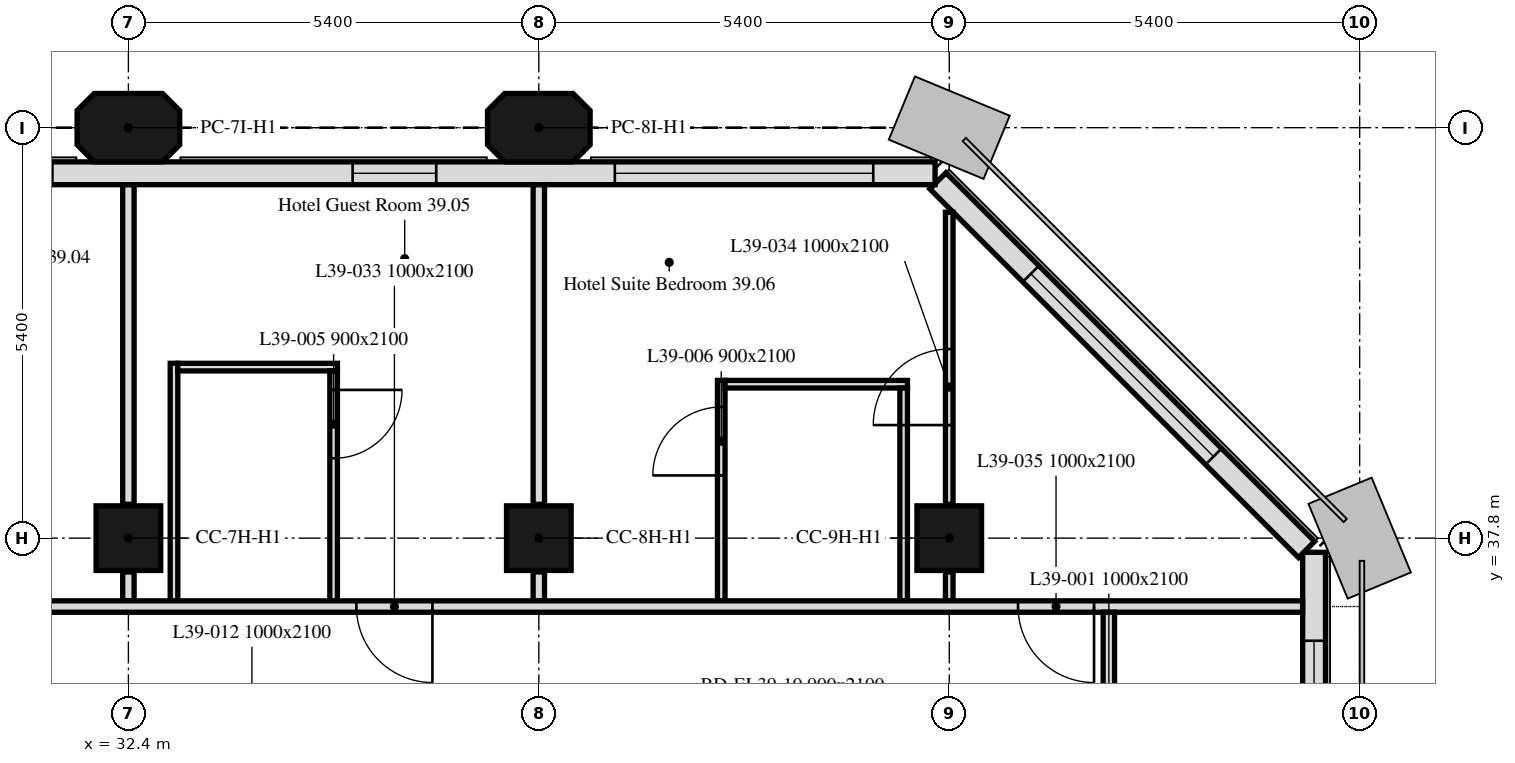
"""IFC4 building model, lengths in metres.
Left out: names, types, materials, properties, quantities, classifications, styles, units other than length and angle.
Written with IfcOpenShell. Run it as: python <this file> out.ifc"""

import sys

from ifc_helpers import new_model, si_unit, direction, frame, frame_2d, origin, origin_2d, place, context, subcontext, project, spatial, polyline, rectangle, outline, extrude, element, fill, save


model = new_model("IFC4")
c1 = context("Model", 3, precision=1e-05, world=origin(), true_north=direction((0.0, 1.0)))
c2 = subcontext(c1, "Body", "Model", "MODEL_VIEW")
j1 = project(units=[si_unit("LENGTHUNIT", "METRE"), si_unit("PLANEANGLEUNIT", "RADIAN")], contexts=[c1])
p1 = place(None, origin())
s1 = spatial("IfcSite", under=j1, at=p1, CompositionType="ELEMENT")
p2 = place(p1, origin())
s2 = spatial("IfcBuilding", under=s1, at=p2, CompositionType="ELEMENT")
p3 = place(p2, frame((0.0, 0.0, 166.0)))
s3 = spatial("IfcBuildingStorey", under=s2, at=p3, CompositionType="ELEMENT", Elevation=166.0)
for number, where, z_axis, x_axis in (
    (1, (32.4, 37.8, 0.0), (0.0, 0.0, 1.0), (1.0, 0.0, 0.0)),
    (2, (37.8, 37.8, 0.0), (0.0, 0.0, 1.0), (1.0, 0.0, 0.0)),
    (3, (43.2, 37.8, 0.0), (0.0, 0.0, 1.0), (1.0, 0.0, 0.0)),
):
    element("IfcColumn", number, at=place(p3, frame(where, z_axis=z_axis, x_axis=x_axis)), inside=s3, PredefinedType="COLUMN", context=c2, shape_type="SweptSolid", body=[
        extrude(rectangle(XDim=0.85, YDim=0.85, at=origin_2d()), origin(), (0.0, 0.0, 1.0), 3.0),
    ])
for number, where, z_axis, x_axis in (
    (4, (32.4, 43.2, 0.0), (0.0, 0.0, 1.0), (1.0, 0.0, 0.0)),
    (5, (37.8, 43.2, 0.0), (0.0, 0.0, 1.0), (1.0, 0.0, 0.0)),
):
    element("IfcColumn", number, at=place(p3, frame(where, z_axis=z_axis, x_axis=x_axis)), inside=s3, PredefinedType="COLUMN", context=c2, shape_type="SweptSolid", body=[
        extrude(outline(polyline([(-0.45, -0.45), (0.45, -0.45), (0.675, -0.225), (0.675, 0.225), (0.45, 0.45), (-0.45, 0.45), (-0.675, 0.225), (-0.675, -0.225), (-0.45, -0.45)])), origin(), (0.0, 0.0, 1.0), 3.0),
    ])
p4 = place(p3, frame((48.0, 5.586, 0.0), z_axis=(0.0, 0.0, 1.0), x_axis=(0.0, 1.0, 0.0)))
e6 = element("IfcWall", 6, at=p4, inside=s3, PredefinedType="SOLIDWALL", context=c2, shape_type="SweptSolid", body=[
    extrude(rectangle(XDim=32.027, YDim=0.3, at=frame_2d((16.014, 0.0))), origin(), (0.0, 0.0, 1.0), 3.0),
])
p5 = place(p4, frame((1.164, 0.0, 0.9)))
e7 = element("IfcOpeningElement", 7, at=p5, cuts=e6, PredefinedType="OPENING", context=c2, shape_type="SweptSolid", body=[
    extrude(rectangle(XDim=1.1, YDim=1.7, at=frame_2d((0.55, 0.85))), frame((0.0, 0.16, 0.0), z_axis=(0.0, -1.0, 0.0), x_axis=(1.0, 0.0, 0.0)), (0.0, 0.0, 1.0), 0.32),
])
p6 = place(p4, frame((2.589, 0.0, 0.9)))
e8 = element("IfcOpeningElement", 8, at=p6, cuts=e6, PredefinedType="OPENING", context=c2, shape_type="SweptSolid", body=[
    extrude(rectangle(XDim=0.65, YDim=1.7, at=frame_2d((0.325, 0.85))), frame((0.0, 0.16, 0.0), z_axis=(0.0, -1.0, 0.0), x_axis=(1.0, 0.0, 0.0)), (0.0, 0.0, 1.0), 0.32),
])
p7 = place(p4, frame((6.564, 0.0, 0.9)))
e9 = element("IfcOpeningElement", 9, at=p7, cuts=e6, PredefinedType="OPENING", context=c2, shape_type="SweptSolid", body=[
    extrude(rectangle(XDim=1.1, YDim=1.7, at=frame_2d((0.55, 0.85))), frame((0.0, 0.16, 0.0), z_axis=(0.0, -1.0, 0.0), x_axis=(1.0, 0.0, 0.0)), (0.0, 0.0, 1.0), 0.32),
])
p8 = place(p4, frame((8.164, 0.0, 0.9)))
e10 = element("IfcOpeningElement", 10, at=p8, cuts=e6, PredefinedType="OPENING", context=c2, shape_type="SweptSolid", body=[
    extrude(rectangle(XDim=1.1, YDim=1.7, at=frame_2d((0.55, 0.85))), frame((0.0, 0.16, 0.0), z_axis=(0.0, -1.0, 0.0), x_axis=(1.0, 0.0, 0.0)), (0.0, 0.0, 1.0), 0.32),
])
p9 = place(p4, frame((11.614, 0.0, 0.9)))
e11 = element("IfcOpeningElement", 11, at=p9, cuts=e6, PredefinedType="OPENING", context=c2, shape_type="SweptSolid", body=[
    extrude(rectangle(XDim=3.4, YDim=1.7, at=frame_2d((1.7, 0.85))), frame((0.0, 0.16, 0.0), z_axis=(0.0, -1.0, 0.0), x_axis=(1.0, 0.0, 0.0)), (0.0, 0.0, 1.0), 0.32),
])
p10 = place(p4, frame((17.364, 0.0, 0.9)))
e12 = element("IfcOpeningElement", 12, at=p10, cuts=e6, PredefinedType="OPENING", context=c2, shape_type="SweptSolid", body=[
    extrude(rectangle(XDim=1.1, YDim=1.7, at=frame_2d((0.55, 0.85))), frame((0.0, 0.16, 0.0), z_axis=(0.0, -1.0, 0.0), x_axis=(1.0, 0.0, 0.0)), (0.0, 0.0, 1.0), 0.32),
])
p11 = place(p4, frame((18.964, 0.0, 0.9)))
e13 = element("IfcOpeningElement", 13, at=p11, cuts=e6, PredefinedType="OPENING", context=c2, shape_type="SweptSolid", body=[
    extrude(rectangle(XDim=1.1, YDim=1.7, at=frame_2d((0.55, 0.85))), frame((0.0, 0.16, 0.0), z_axis=(0.0, -1.0, 0.0), x_axis=(1.0, 0.0, 0.0)), (0.0, 0.0, 1.0), 0.32),
])
p12 = place(p4, frame((22.414, 0.0, 0.9)))
e14 = element("IfcOpeningElement", 14, at=p12, cuts=e6, PredefinedType="OPENING", context=c2, shape_type="SweptSolid", body=[
    extrude(rectangle(XDim=3.4, YDim=1.7, at=frame_2d((1.7, 0.85))), frame((0.0, 0.16, 0.0), z_axis=(0.0, -1.0, 0.0), x_axis=(1.0, 0.0, 0.0)), (0.0, 0.0, 1.0), 0.32),
])
p13 = place(p4, frame((28.164, 0.0, 0.9)))
e15 = element("IfcOpeningElement", 15, at=p13, cuts=e6, PredefinedType="OPENING", context=c2, shape_type="SweptSolid", body=[
    extrude(rectangle(XDim=1.1, YDim=1.7, at=frame_2d((0.55, 0.85))), frame((0.0, 0.16, 0.0), z_axis=(0.0, -1.0, 0.0), x_axis=(1.0, 0.0, 0.0)), (0.0, 0.0, 1.0), 0.32),
])
p14 = place(p4, frame((29.764, 0.0, 0.9)))
e16 = element("IfcOpeningElement", 16, at=p14, cuts=e6, PredefinedType="OPENING", context=c2, shape_type="SweptSolid", body=[
    extrude(rectangle(XDim=1.1, YDim=1.7, at=frame_2d((0.55, 0.85))), frame((0.0, 0.16, 0.0), z_axis=(0.0, -1.0, 0.0), x_axis=(1.0, 0.0, 0.0)), (0.0, 0.0, 1.0), 0.32),
])
p15 = place(p3, frame((47.901, 37.65, 0.0), z_axis=(0.0, 0.0, 1.0), x_axis=(-0.707106781187, 0.707106781187, 0.0)))
e17 = element("IfcWall", 17, at=p15, inside=s3, PredefinedType="SOLIDWALL", context=c2, shape_type="SweptSolid", body=[
    extrude(rectangle(XDim=6.86, YDim=0.3, at=frame_2d((3.43, 0.0))), origin(), (0.0, 0.0, 1.0), 3.0),
])
p16 = place(p15, frame((1.73, 0.0, 0.9)))
e18 = element("IfcOpeningElement", 18, at=p16, cuts=e17, PredefinedType="OPENING", context=c2, shape_type="SweptSolid", body=[
    extrude(rectangle(XDim=3.4, YDim=1.7, at=frame_2d((1.7, 0.85))), frame((0.0, 0.16, 0.0), z_axis=(0.0, -1.0, 0.0), x_axis=(1.0, 0.0, 0.0)), (0.0, 0.0, 1.0), 0.32),
])
p17 = place(p3, frame((43.014, 42.6, 0.0), z_axis=(0.0, 0.0, 1.0), x_axis=(-1.0, 0.0, 0.0)))
e19 = element("IfcWall", 19, at=p17, inside=s3, PredefinedType="SOLIDWALL", context=c2, shape_type="SweptSolid", body=[
    extrude(rectangle(XDim=32.027, YDim=0.3, at=frame_2d((16.014, 0.0))), origin(), (0.0, 0.0, 1.0), 3.0),
])
p18 = place(p17, frame((0.814, 0.0, 0.9)))
e20 = element("IfcOpeningElement", 20, at=p18, cuts=e19, PredefinedType="OPENING", context=c2, shape_type="SweptSolid", body=[
    extrude(rectangle(XDim=3.4, YDim=1.7, at=frame_2d((1.7, 0.85))), frame((0.0, 0.16, 0.0), z_axis=(0.0, -1.0, 0.0), x_axis=(1.0, 0.0, 0.0)), (0.0, 0.0, 1.0), 0.32),
])
p19 = place(p17, frame((6.564, 0.0, 0.9)))
e21 = element("IfcOpeningElement", 21, at=p19, cuts=e19, PredefinedType="OPENING", context=c2, shape_type="SweptSolid", body=[
    extrude(rectangle(XDim=1.1, YDim=1.7, at=frame_2d((0.55, 0.85))), frame((0.0, 0.16, 0.0), z_axis=(0.0, -1.0, 0.0), x_axis=(1.0, 0.0, 0.0)), (0.0, 0.0, 1.0), 0.32),
])
p20 = place(p17, frame((11.614, 0.0, 0.9)))
e22 = element("IfcOpeningElement", 22, at=p20, cuts=e19, PredefinedType="OPENING", context=c2, shape_type="SweptSolid", body=[
    extrude(rectangle(XDim=3.4, YDim=1.7, at=frame_2d((1.7, 0.85))), frame((0.0, 0.16, 0.0), z_axis=(0.0, -1.0, 0.0), x_axis=(1.0, 0.0, 0.0)), (0.0, 0.0, 1.0), 0.32),
])
p21 = place(p17, frame((17.364, 0.0, 0.9)))
e23 = element("IfcOpeningElement", 23, at=p21, cuts=e19, PredefinedType="OPENING", context=c2, shape_type="SweptSolid", body=[
    extrude(rectangle(XDim=1.1, YDim=1.7, at=frame_2d((0.55, 0.85))), frame((0.0, 0.16, 0.0), z_axis=(0.0, -1.0, 0.0), x_axis=(1.0, 0.0, 0.0)), (0.0, 0.0, 1.0), 0.32),
])
p22 = place(p17, frame((22.414, 0.0, 0.9)))
e24 = element("IfcOpeningElement", 24, at=p22, cuts=e19, PredefinedType="OPENING", context=c2, shape_type="SweptSolid", body=[
    extrude(rectangle(XDim=3.4, YDim=1.7, at=frame_2d((1.7, 0.85))), frame((0.0, 0.16, 0.0), z_axis=(0.0, -1.0, 0.0), x_axis=(1.0, 0.0, 0.0)), (0.0, 0.0, 1.0), 0.32),
])
p23 = place(p17, frame((28.164, 0.0, 0.9)))
e25 = element("IfcOpeningElement", 25, at=p23, cuts=e19, PredefinedType="OPENING", context=c2, shape_type="SweptSolid", body=[
    extrude(rectangle(XDim=1.1, YDim=1.7, at=frame_2d((0.55, 0.85))), frame((0.0, 0.16, 0.0), z_axis=(0.0, -1.0, 0.0), x_axis=(1.0, 0.0, 0.0)), (0.0, 0.0, 1.0), 0.32),
])
p24 = place(p3, frame((32.4, 36.975, 0.0), z_axis=(0.0, 0.0, 1.0), x_axis=(0.0, 1.0, 0.0)))
e26 = element("IfcWall", 26, at=p24, inside=s3, PredefinedType="PARTITIONING", context=c2, shape_type="SweptSolid", body=[
    extrude(rectangle(XDim=0.38, YDim=0.15, at=frame_2d((0.19, 0.0))), origin(), (0.0, 0.0, 1.0), 3.0),
])
p25 = place(p3, frame((32.4, 38.245, 0.0), z_axis=(0.0, 0.0, 1.0), x_axis=(0.0, 1.0, 0.0)))
e27 = element("IfcWall", 27, at=p25, inside=s3, PredefinedType="PARTITIONING", context=c2, shape_type="SweptSolid", body=[
    extrude(rectangle(XDim=4.204, YDim=0.15, at=frame_2d((2.102, 0.0))), origin(), (0.0, 0.0, 1.0), 3.0),
])
p26 = place(p3, frame((33.0, 36.975, 0.0), z_axis=(0.0, 0.0, 1.0), x_axis=(0.0, 1.0, 0.0)))
e28 = element("IfcWall", 28, at=p26, inside=s3, PredefinedType="PARTITIONING", context=c2, shape_type="SweptSolid", body=[
    extrude(rectangle(XDim=3.125, YDim=0.1, at=frame_2d((1.562, 0.0))), origin(), (0.0, 0.0, 1.0), 3.0),
])
p27 = place(p3, frame((33.05, 40.05, 0.0), z_axis=(0.0, 0.0, 1.0), x_axis=(1.0, 0.0, 0.0)))
e29 = element("IfcWall", 29, at=p27, inside=s3, PredefinedType="PARTITIONING", context=c2, shape_type="SweptSolid", body=[
    extrude(rectangle(XDim=2.1, YDim=0.1, at=frame_2d((1.05, 0.0))), origin(), (0.0, 0.0, 1.0), 3.0),
])
p28 = place(p3, frame((35.1, 40.0, 0.0), z_axis=(0.0, 0.0, 1.0), x_axis=(0.0, -1.0, 0.0)))
e30 = element("IfcWall", 30, at=p28, inside=s3, PredefinedType="PARTITIONING", context=c2, shape_type="SweptSolid", body=[
    extrude(rectangle(XDim=3.025, YDim=0.1, at=frame_2d((1.512, 0.0))), origin(), (0.0, 0.0, 1.0), 3.0),
])
p29 = place(p28, frame((0.25, 0.0, 0.0)))
e31 = element("IfcOpeningElement", 31, at=p29, cuts=e30, PredefinedType="OPENING", context=c2, shape_type="SweptSolid", body=[
    extrude(rectangle(XDim=0.9, YDim=2.1, at=frame_2d((0.45, 1.05))), frame((0.0, 0.05, 0.0), z_axis=(0.0, -1.0, 0.0), x_axis=(1.0, 0.0, 0.0)), (0.0, 0.0, 1.0), 0.1),
])
p30 = place(p3, frame((37.8, 36.975, 0.0), z_axis=(0.0, 0.0, 1.0), x_axis=(0.0, 1.0, 0.0)))
e32 = element("IfcWall", 32, at=p30, inside=s3, PredefinedType="PARTITIONING", context=c2, shape_type="SweptSolid", body=[
    extrude(rectangle(XDim=0.38, YDim=0.15, at=frame_2d((0.19, 0.0))), origin(), (0.0, 0.0, 1.0), 3.0),
])
p31 = place(p3, frame((37.8, 38.245, 0.0), z_axis=(0.0, 0.0, 1.0), x_axis=(0.0, 1.0, 0.0)))
e33 = element("IfcWall", 33, at=p31, inside=s3, PredefinedType="PARTITIONING", context=c2, shape_type="SweptSolid", body=[
    extrude(rectangle(XDim=4.204, YDim=0.15, at=frame_2d((2.102, 0.0))), origin(), (0.0, 0.0, 1.0), 3.0),
])
p32 = place(p3, frame((40.2, 36.975, 0.0), z_axis=(0.0, 0.0, 1.0), x_axis=(0.0, 1.0, 0.0)))
e34 = element("IfcWall", 34, at=p32, inside=s3, PredefinedType="PARTITIONING", context=c2, shape_type="SweptSolid", body=[
    extrude(rectangle(XDim=2.9, YDim=0.1, at=frame_2d((1.45, 0.0))), origin(), (0.0, 0.0, 1.0), 3.0),
])
p33 = place(p32, frame((1.65, 0.0, 0.0)))
e35 = element("IfcOpeningElement", 35, at=p33, cuts=e34, PredefinedType="OPENING", context=c2, shape_type="SweptSolid", body=[
    extrude(rectangle(XDim=0.9, YDim=2.1, at=frame_2d((0.45, 1.05))), frame((0.0, 0.05, 0.0), z_axis=(0.0, -1.0, 0.0), x_axis=(1.0, 0.0, 0.0)), (0.0, 0.0, 1.0), 0.1),
])
p34 = place(p3, frame((40.25, 39.825, 0.0), z_axis=(0.0, 0.0, 1.0), x_axis=(1.0, 0.0, 0.0)))
e36 = element("IfcWall", 36, at=p34, inside=s3, PredefinedType="PARTITIONING", context=c2, shape_type="SweptSolid", body=[
    extrude(rectangle(XDim=2.4, YDim=0.1, at=frame_2d((1.2, 0.0))), origin(), (0.0, 0.0, 1.0), 3.0),
])
p35 = place(p3, frame((42.6, 39.775, 0.0), z_axis=(0.0, 0.0, 1.0), x_axis=(0.0, -1.0, 0.0)))
e37 = element("IfcWall", 37, at=p35, inside=s3, PredefinedType="PARTITIONING", context=c2, shape_type="SweptSolid", body=[
    extrude(rectangle(XDim=2.8, YDim=0.1, at=frame_2d((1.4, 0.0))), origin(), (0.0, 0.0, 1.0), 3.0),
])
p36 = place(p3, frame((43.2, 36.975, 0.0), z_axis=(0.0, 0.0, 1.0), x_axis=(0.0, 1.0, 0.0)))
e38 = element("IfcWall", 38, at=p36, inside=s3, PredefinedType="PARTITIONING", context=c2, shape_type="SweptSolid", body=[
    extrude(rectangle(XDim=0.38, YDim=0.1, at=frame_2d((0.19, 0.0))), origin(), (0.0, 0.0, 1.0), 3.0),
])
p37 = place(p3, frame((43.2, 38.245, 0.0), z_axis=(0.0, 0.0, 1.0), x_axis=(0.0, 1.0, 0.0)))
e39 = element("IfcWall", 39, at=p37, inside=s3, PredefinedType="PARTITIONING", context=c2, shape_type="SweptSolid", body=[
    extrude(rectangle(XDim=3.843, YDim=0.1, at=frame_2d((1.921, 0.0))), origin(), (0.0, 0.0, 1.0), 3.0),
])
p38 = place(p37, frame((1.042, 0.0, 0.0)))
e40 = element("IfcOpeningElement", 40, at=p38, cuts=e39, PredefinedType="OPENING", context=c2, shape_type="SweptSolid", body=[
    extrude(rectangle(XDim=1.0, YDim=2.1, at=frame_2d((0.5, 1.05))), frame((0.0, 0.05, 0.0), z_axis=(0.0, -1.0, 0.0), x_axis=(1.0, 0.0, 0.0)), (0.0, 0.0, 1.0), 0.1),
])
p39 = place(p3, frame((47.849, 36.9, 0.0), z_axis=(0.0, 0.0, 1.0), x_axis=(-1.0, 0.0, 0.0)))
e41 = element("IfcWall", 41, at=p39, inside=s3, PredefinedType="PARTITIONING", context=c2, shape_type="SweptSolid", body=[
    extrude(rectangle(XDim=41.698, YDim=0.15, at=frame_2d((20.849, 0.0))), origin(), (0.0, 0.0, 1.0), 3.0),
])
p40 = place(p39, frame((39.249, 0.0, 0.0)))
e42 = element("IfcOpeningElement", 42, at=p40, cuts=e41, PredefinedType="OPENING", context=c2, shape_type="SweptSolid", body=[
    extrude(rectangle(XDim=1.0, YDim=2.1, at=frame_2d((0.5, 1.05))), frame((0.0, 0.075, 0.0), z_axis=(0.0, -1.0, 0.0), x_axis=(1.0, 0.0, 0.0)), (0.0, 0.0, 1.0), 0.15),
])
p41 = place(p39, frame((28.449, 0.0, 0.0)))
e43 = element("IfcOpeningElement", 43, at=p41, cuts=e41, PredefinedType="OPENING", context=c2, shape_type="SweptSolid", body=[
    extrude(rectangle(XDim=1.0, YDim=2.1, at=frame_2d((0.5, 1.05))), frame((0.0, 0.075, 0.0), z_axis=(0.0, -1.0, 0.0), x_axis=(1.0, 0.0, 0.0)), (0.0, 0.0, 1.0), 0.15),
])
p42 = place(p39, frame((16.849, 0.0, 0.0)))
e44 = element("IfcOpeningElement", 44, at=p42, cuts=e41, PredefinedType="OPENING", context=c2, shape_type="SweptSolid", body=[
    extrude(rectangle(XDim=1.0, YDim=2.1, at=frame_2d((0.5, 1.05))), frame((0.0, 0.075, 0.0), z_axis=(0.0, -1.0, 0.0), x_axis=(1.0, 0.0, 0.0)), (0.0, 0.0, 1.0), 0.15),
])
p43 = place(p39, frame((11.449, 0.0, 0.0)))
e45 = element("IfcOpeningElement", 45, at=p43, cuts=e41, PredefinedType="OPENING", context=c2, shape_type="SweptSolid", body=[
    extrude(rectangle(XDim=1.0, YDim=2.1, at=frame_2d((0.5, 1.05))), frame((0.0, 0.075, 0.0), z_axis=(0.0, -1.0, 0.0), x_axis=(1.0, 0.0, 0.0)), (0.0, 0.0, 1.0), 0.15),
])
p44 = place(p39, frame((2.744, 0.0, 0.0)))
e46 = element("IfcOpeningElement", 46, at=p44, cuts=e41, PredefinedType="OPENING", context=c2, shape_type="SweptSolid", body=[
    extrude(rectangle(XDim=1.0, YDim=2.1, at=frame_2d((0.5, 1.05))), frame((0.0, 0.075, 0.0), z_axis=(0.0, -1.0, 0.0), x_axis=(1.0, 0.0, 0.0)), (0.0, 0.0, 1.0), 0.15),
])
p45 = place(p3, frame((45.3, 36.825, 0.0), z_axis=(0.0, 0.0, 1.0), x_axis=(0.0, -1.0, 0.0)))
e47 = element("IfcWall", 47, at=p45, inside=s3, PredefinedType="PARTITIONING", context=c2, shape_type="SweptSolid", body=[
    extrude(rectangle(XDim=15.15, YDim=0.15, at=frame_2d((7.575, 0.0))), origin(), (0.0, 0.0, 1.0), 2.4),
])
p46 = place(p45, frame((1.675, 0.0, 0.0)))
e48 = element("IfcOpeningElement", 48, at=p46, cuts=e47, PredefinedType="OPENING", context=c2, shape_type="SweptSolid", body=[
    extrude(rectangle(XDim=1.0, YDim=2.1, at=frame_2d((0.5, 1.05))), frame((0.0, 0.075, 0.0), z_axis=(0.0, -1.0, 0.0), x_axis=(1.0, 0.0, 0.0)), (0.0, 0.0, 1.0), 0.15),
])
p47 = place(p45, frame((7.975, 0.0, 0.0)))
e49 = element("IfcOpeningElement", 49, at=p47, cuts=e47, PredefinedType="OPENING", context=c2, shape_type="SweptSolid", body=[
    extrude(rectangle(XDim=1.0, YDim=2.1, at=frame_2d((0.5, 1.05))), frame((0.0, 0.075, 0.0), z_axis=(0.0, -1.0, 0.0), x_axis=(1.0, 0.0, 0.0)), (0.0, 0.0, 1.0), 0.15),
])
p48 = place(p14, origin())
e50 = element("IfcWindow", 50, at=p48, inside=s3, PartitioningType="SINGLE_PANEL", PredefinedType="WINDOW", context=c2, shape_type="SweptSolid", body=[
    extrude(rectangle(XDim=1.1, YDim=1.7, at=frame_2d((0.55, 0.85))), frame((0.0, 0.03, 0.0), z_axis=(0.0, -1.0, 0.0), x_axis=(1.0, 0.0, 0.0)), (0.0, 0.0, 1.0), 0.06),
])
fill(e16, e50)
p49 = place(p16, origin())
e51 = element("IfcWindow", 51, at=p49, inside=s3, PartitioningType="SINGLE_PANEL", PredefinedType="WINDOW", context=c2, shape_type="SweptSolid", body=[
    extrude(rectangle(XDim=3.4, YDim=1.7, at=frame_2d((1.7, 0.85))), frame((0.0, 0.03, 0.0), z_axis=(0.0, -1.0, 0.0), x_axis=(1.0, 0.0, 0.0)), (0.0, 0.0, 1.0), 0.06),
])
fill(e18, e51)
p50 = place(p18, origin())
e52 = element("IfcWindow", 52, at=p50, inside=s3, PartitioningType="SINGLE_PANEL", PredefinedType="WINDOW", context=c2, shape_type="SweptSolid", body=[
    extrude(rectangle(XDim=3.4, YDim=1.7, at=frame_2d((1.7, 0.85))), frame((0.0, 0.03, 0.0), z_axis=(0.0, -1.0, 0.0), x_axis=(1.0, 0.0, 0.0)), (0.0, 0.0, 1.0), 0.06),
])
fill(e20, e52)
p51 = place(p19, origin())
e53 = element("IfcWindow", 53, at=p51, inside=s3, PartitioningType="SINGLE_PANEL", PredefinedType="WINDOW", context=c2, shape_type="SweptSolid", body=[
    extrude(rectangle(XDim=1.1, YDim=1.7, at=frame_2d((0.55, 0.85))), frame((0.0, 0.03, 0.0), z_axis=(0.0, -1.0, 0.0), x_axis=(1.0, 0.0, 0.0)), (0.0, 0.0, 1.0), 0.06),
])
fill(e21, e53)
p52 = place(p20, origin())
e54 = element("IfcWindow", 54, at=p52, inside=s3, PartitioningType="SINGLE_PANEL", PredefinedType="WINDOW", context=c2, shape_type="SweptSolid", body=[
    extrude(rectangle(XDim=3.4, YDim=1.7, at=frame_2d((1.7, 0.85))), frame((0.0, 0.03, 0.0), z_axis=(0.0, -1.0, 0.0), x_axis=(1.0, 0.0, 0.0)), (0.0, 0.0, 1.0), 0.06),
])
fill(e22, e54)
p53 = place(p29, origin())
e55 = element("IfcDoor", 55, at=p53, inside=s3, OperationType="SINGLE_SWING_LEFT", PredefinedType="DOOR", context=c2, shape_type="SweptSolid", body=[
    extrude(rectangle(XDim=0.9, YDim=2.1, at=frame_2d((0.45, 1.05))), frame((0.0, 0.025, 0.0), z_axis=(0.0, -1.0, 0.0), x_axis=(1.0, 0.0, 0.0)), (0.0, 0.0, 1.0), 0.05),
])
fill(e31, e55)
p54 = place(p33, origin())
e56 = element("IfcDoor", 56, at=p54, inside=s3, OperationType="SINGLE_SWING_RIGHT", PredefinedType="DOOR", context=c2, shape_type="SweptSolid", body=[
    extrude(rectangle(XDim=0.9, YDim=2.1, at=frame_2d((0.45, 1.05))), frame((0.0, 0.025, 0.0), z_axis=(0.0, -1.0, 0.0), x_axis=(1.0, 0.0, 0.0)), (0.0, 0.0, 1.0), 0.05),
])
fill(e35, e56)
p55 = place(p43, origin())
e57 = element("IfcDoor", 57, at=p55, inside=s3, OperationType="SINGLE_SWING_RIGHT", PredefinedType="DOOR", context=c2, shape_type="SweptSolid", body=[
    extrude(rectangle(XDim=1.0, YDim=2.1, at=frame_2d((0.5, 1.05))), frame((0.0, 0.025, 0.0), z_axis=(0.0, -1.0, 0.0), x_axis=(1.0, 0.0, 0.0)), (0.0, 0.0, 1.0), 0.05),
])
fill(e45, e57)
p56 = place(p38, origin())
e58 = element("IfcDoor", 58, at=p56, inside=s3, OperationType="SINGLE_SWING_RIGHT", PredefinedType="DOOR", context=c2, shape_type="SweptSolid", body=[
    extrude(rectangle(XDim=1.0, YDim=2.1, at=frame_2d((0.5, 1.05))), frame((0.0, 0.025, 0.0), z_axis=(0.0, -1.0, 0.0), x_axis=(1.0, 0.0, 0.0)), (0.0, 0.0, 1.0), 0.05),
])
fill(e40, e58)
p57 = place(p44, origin())
e59 = element("IfcDoor", 59, at=p57, inside=s3, OperationType="SINGLE_SWING_LEFT", PredefinedType="DOOR", context=c2, shape_type="SweptSolid", body=[
    extrude(rectangle(XDim=1.0, YDim=2.1, at=frame_2d((0.5, 1.05))), frame((0.0, 0.025, 0.0), z_axis=(0.0, -1.0, 0.0), x_axis=(1.0, 0.0, 0.0)), (0.0, 0.0, 1.0), 0.05),
])
fill(e46, e59)
save(model, sys.argv[1])
